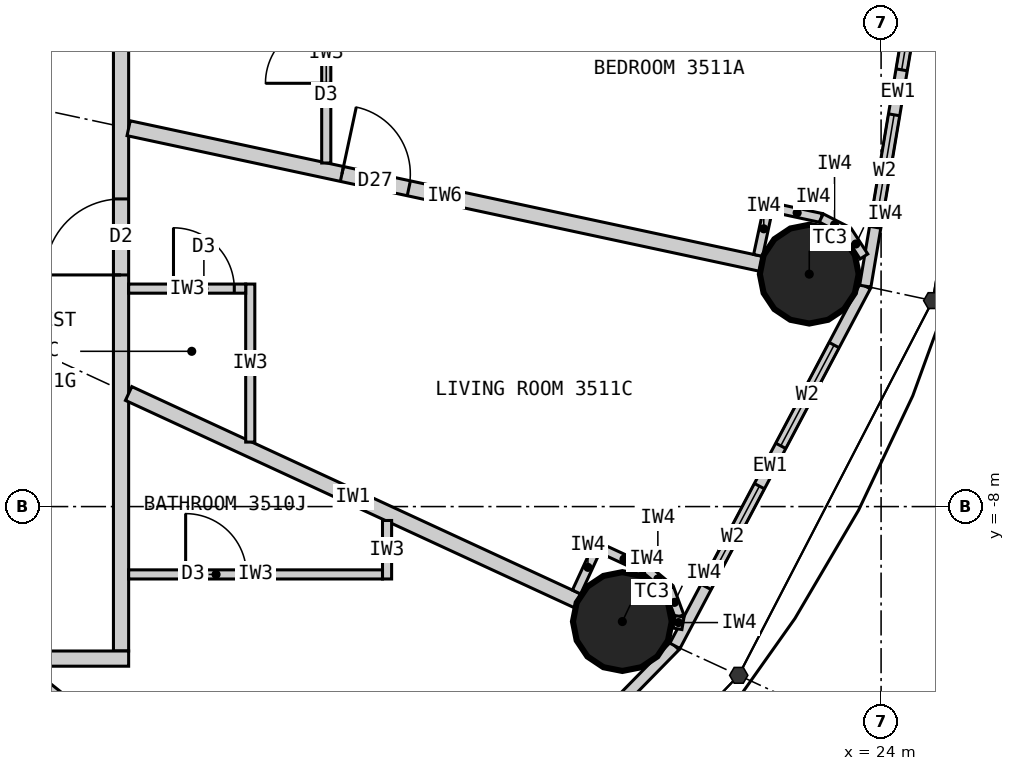
"""IFC4 building model, lengths in metres.
Left out: names, types, materials, properties, quantities, classifications, styles, units other than length and angle.
Written with IfcOpenShell. Run it as: python <this file> out.ifc"""

import sys

from ifc_helpers import new_model, si_unit, direction, frame, frame_2d, origin, origin_2d, place, context, subcontext, project, spatial, rectangle, circle, extrude, clip, halfspace, element, fill, save


model = new_model("IFC4")
c1 = context("Model", 3, precision=1e-05, world=origin(), true_north=direction((0.0, 1.0)))
c2 = subcontext(c1, "Body", "Model", "MODEL_VIEW")
j1 = project(units=[si_unit("LENGTHUNIT", "METRE"), si_unit("PLANEANGLEUNIT", "RADIAN")], contexts=[c1])
p1 = place(None, origin())
s1 = spatial("IfcSite", under=j1, at=p1, CompositionType="ELEMENT")
p2 = place(p1, origin())
s2 = spatial("IfcBuilding", under=s1, at=p2, CompositionType="ELEMENT")
p3 = place(p2, frame((0.0, 0.0, 135.3)))
s3 = spatial("IfcBuildingStorey", under=s2, at=p3, CompositionType="ELEMENT", Elevation=135.3)
for number, where, z_axis, x_axis in (
    (1, (20.596, -9.513, 0.0), (0.0, 0.0, 1.0), (1.0, 0.0, 0.0)),
    (2, (23.055, -4.942, 0.0), (0.0, 0.0, 1.0), (1.0, 0.0, 0.0)),
):
    element("IfcColumn", number, at=place(p3, frame(where, z_axis=z_axis, x_axis=x_axis)), inside=s3, PredefinedType="COLUMN", context=c2, shape_type="Clipping", body=[
        clip(extrude(circle(Radius=0.65, at=origin_2d()), origin(), (0.0, 0.0, 1.0), 3.3), halfspace(frame((0.0, 0.0, 2.25), z_axis=(0.0, 0.0, 1.0), x_axis=(1.0, 0.0, 0.0)), False)),
    ])
p4 = place(p3, frame((17.332, -13.866, 0.0), z_axis=(0.0, 0.0, 1.0), x_axis=(0.700136650834, 0.714008872605, 0.0)))
e3 = element("IfcWall", 3, at=p4, inside=s3, PredefinedType="ELEMENTEDWALL", context=c2, shape_type="SweptSolid", body=[
    extrude(rectangle(XDim=5.649, YDim=0.15, at=frame_2d((2.825, 0.0))), origin(), (0.0, 0.0, 1.0), 3.05),
])
p5 = place(p4, frame((1.025, 0.0, 0.9)))
e4 = element("IfcOpeningElement", 4, at=p5, cuts=e3, PredefinedType="OPENING", context=c2, shape_type="SweptSolid", body=[
    extrude(rectangle(XDim=1.5, YDim=1.9, at=frame_2d((0.75, 0.95))), frame((0.0, 0.085, 0.0), z_axis=(0.0, -1.0, 0.0), x_axis=(1.0, 0.0, 0.0)), (0.0, 0.0, 1.0), 0.17),
])
p6 = place(p4, frame((3.125, 0.0, 0.9)))
e5 = element("IfcOpeningElement", 5, at=p6, cuts=e3, PredefinedType="OPENING", context=c2, shape_type="SweptSolid", body=[
    extrude(rectangle(XDim=1.5, YDim=1.9, at=frame_2d((0.75, 0.95))), frame((0.0, 0.085, 0.0), z_axis=(0.0, -1.0, 0.0), x_axis=(1.0, 0.0, 0.0)), (0.0, 0.0, 1.0), 0.17),
])
p7 = place(p3, frame((21.287, -9.832, 0.0), z_axis=(0.0, 0.0, 1.0), x_axis=(0.467814388454, 0.883826735257, 0.0)))
e6 = element("IfcWall", 6, at=p7, inside=s3, PredefinedType="ELEMENTEDWALL", context=c2, shape_type="SweptSolid", body=[
    extrude(rectangle(XDim=5.354, YDim=0.15, at=frame_2d((2.677, 0.0))), origin(), (0.0, 0.0, 1.0), 3.05),
])
p8 = place(p7, frame((0.877, 0.0, 0.9)))
e7 = element("IfcOpeningElement", 7, at=p8, cuts=e6, PredefinedType="OPENING", context=c2, shape_type="SweptSolid", body=[
    extrude(rectangle(XDim=1.5, YDim=1.9, at=frame_2d((0.75, 0.95))), frame((0.0, 0.085, 0.0), z_axis=(0.0, -1.0, 0.0), x_axis=(1.0, 0.0, 0.0)), (0.0, 0.0, 1.0), 0.17),
])
p9 = place(p7, frame((2.977, 0.0, 0.9)))
e8 = element("IfcOpeningElement", 8, at=p9, cuts=e6, PredefinedType="OPENING", context=c2, shape_type="SweptSolid", body=[
    extrude(rectangle(XDim=1.5, YDim=1.9, at=frame_2d((0.75, 0.95))), frame((0.0, 0.085, 0.0), z_axis=(0.0, -1.0, 0.0), x_axis=(1.0, 0.0, 0.0)), (0.0, 0.0, 1.0), 0.17),
])
p10 = place(p3, frame((23.792, -5.1, 0.0), z_axis=(0.0, 0.0, 1.0), x_axis=(0.165883894218, 0.986145290329, 0.0)))
e9 = element("IfcWall", 9, at=p10, inside=s3, PredefinedType="ELEMENTEDWALL", context=c2, shape_type="SweptSolid", body=[
    extrude(rectangle(XDim=5.172, YDim=0.15, at=frame_2d((2.586, 0.0))), origin(), (0.0, 0.0, 1.0), 3.05),
])
p11 = place(p10, frame((0.786, 0.0, 0.9)))
e10 = element("IfcOpeningElement", 10, at=p11, cuts=e9, PredefinedType="OPENING", context=c2, shape_type="SweptSolid", body=[
    extrude(rectangle(XDim=1.5, YDim=1.9, at=frame_2d((0.75, 0.95))), frame((0.0, 0.085, 0.0), z_axis=(0.0, -1.0, 0.0), x_axis=(1.0, 0.0, 0.0)), (0.0, 0.0, 1.0), 0.17),
])
p12 = place(p10, frame((2.886, 0.0, 0.9)))
e11 = element("IfcOpeningElement", 11, at=p12, cuts=e9, PredefinedType="OPENING", context=c2, shape_type="SweptSolid", body=[
    extrude(rectangle(XDim=1.5, YDim=1.9, at=frame_2d((0.75, 0.95))), frame((0.0, 0.085, 0.0), z_axis=(0.0, -1.0, 0.0), x_axis=(1.0, 0.0, 0.0)), (0.0, 0.0, 1.0), 0.17),
])
p13 = place(p3, frame((14.0, -9.9, 0.0), z_axis=(0.0, 0.0, 1.0), x_axis=(0.0, 1.0, 0.0)))
e12 = element("IfcWall", 12, at=p13, inside=s3, PredefinedType="PARTITIONING", context=c2, shape_type="SweptSolid", body=[
    extrude(rectangle(XDim=19.8, YDim=0.2, at=frame_2d((9.9, 0.0))), origin(), (0.0, 0.0, 1.0), 3.05),
])
p14 = place(p13, frame((4.948, 0.0, 0.0)))
e13 = element("IfcOpeningElement", 13, at=p14, cuts=e12, PredefinedType="OPENING", context=c2, shape_type="SweptSolid", body=[
    extrude(rectangle(XDim=1.0, YDim=2.2, at=frame_2d((0.5, 1.1))), frame((0.0, 0.11, 0.0), z_axis=(0.0, -1.0, 0.0), x_axis=(1.0, 0.0, 0.0)), (0.0, 0.0, 1.0), 0.22),
])
p15 = place(p13, frame((18.641, 0.0, 0.0)))
e14 = element("IfcOpeningElement", 14, at=p15, cuts=e12, PredefinedType="OPENING", context=c2, shape_type="SweptSolid", body=[
    extrude(rectangle(XDim=1.0, YDim=2.2, at=frame_2d((0.5, 1.1))), frame((0.0, 0.11, 0.0), z_axis=(0.0, -1.0, 0.0), x_axis=(1.0, 0.0, 0.0)), (0.0, 0.0, 1.0), 0.22),
])
p16 = place(p3, frame((14.1, -10.0, 0.0), z_axis=(0.0, 0.0, 1.0), x_axis=(-1.0, 0.0, 0.0)))
e15 = element("IfcWall", 15, at=p16, inside=s3, PredefinedType="PARTITIONING", context=c2, shape_type="SweptSolid", body=[
    extrude(rectangle(XDim=28.2, YDim=0.2, at=frame_2d((14.1, 0.0))), origin(), (0.0, 0.0, 1.0), 3.05),
])
p17 = place(p16, frame((25.754, 0.0, 0.0)))
e16 = element("IfcOpeningElement", 16, at=p17, cuts=e15, PredefinedType="OPENING", context=c2, shape_type="SweptSolid", body=[
    extrude(rectangle(XDim=1.0, YDim=2.2, at=frame_2d((0.5, 1.1))), frame((0.0, 0.11, 0.0), z_axis=(0.0, -1.0, 0.0), x_axis=(1.0, 0.0, 0.0)), (0.0, 0.0, 1.0), 0.22),
])
p18 = place(p16, frame((18.029, 0.0, 0.0)))
e17 = element("IfcOpeningElement", 17, at=p18, cuts=e15, PredefinedType="OPENING", context=c2, shape_type="SweptSolid", body=[
    extrude(rectangle(XDim=1.0, YDim=2.2, at=frame_2d((0.5, 1.1))), frame((0.0, 0.11, 0.0), z_axis=(0.0, -1.0, 0.0), x_axis=(1.0, 0.0, 0.0)), (0.0, 0.0, 1.0), 0.22),
])
p19 = place(p16, frame((12.884, 0.0, 0.0)))
e18 = element("IfcOpeningElement", 18, at=p19, cuts=e15, PredefinedType="OPENING", context=c2, shape_type="SweptSolid", body=[
    extrude(rectangle(XDim=1.0, YDim=2.2, at=frame_2d((0.5, 1.1))), frame((0.0, 0.11, 0.0), z_axis=(0.0, -1.0, 0.0), x_axis=(1.0, 0.0, 0.0)), (0.0, 0.0, 1.0), 0.22),
])
p20 = place(p16, frame((9.075, 0.0, 0.0)))
e19 = element("IfcOpeningElement", 19, at=p20, cuts=e15, PredefinedType="OPENING", context=c2, shape_type="SweptSolid", body=[
    extrude(rectangle(XDim=1.0, YDim=2.2, at=frame_2d((0.5, 1.1))), frame((0.0, 0.11, 0.0), z_axis=(0.0, -1.0, 0.0), x_axis=(1.0, 0.0, 0.0)), (0.0, 0.0, 1.0), 0.22),
])
p21 = place(p16, frame((3.59, 0.0, 0.0)))
e20 = element("IfcOpeningElement", 20, at=p21, cuts=e15, PredefinedType="OPENING", context=c2, shape_type="SweptSolid", body=[
    extrude(rectangle(XDim=1.0, YDim=2.2, at=frame_2d((0.5, 1.1))), frame((0.0, 0.11, 0.0), z_axis=(0.0, -1.0, 0.0), x_axis=(1.0, 0.0, 0.0)), (0.0, 0.0, 1.0), 0.22),
])
p22 = place(p3, frame((12.625, -10.1, 0.0), z_axis=(0.0, 0.0, 1.0), x_axis=(0.780863644897, -0.624701503182, 0.0)))
e21 = element("IfcWall", 21, at=p22, inside=s3, PredefinedType="PARTITIONING", context=c2, shape_type="SweptSolid", body=[
    extrude(rectangle(XDim=4.612, YDim=0.2, at=frame_2d((2.306, 0.0))), origin(), (0.0, 0.0, 1.0), 2.15),
])
p23 = place(p22, frame((2.77, 0.0, 0.0)))
e22 = element("IfcOpeningElement", 22, at=p23, cuts=e21, PredefinedType="OPENING", context=c2, shape_type="SweptSolid", body=[
    extrude(rectangle(XDim=0.9, YDim=2.1, at=frame_2d((0.45, 1.05))), frame((0.0, 0.11, 0.0), z_axis=(0.0, -1.0, 0.0), x_axis=(1.0, 0.0, 0.0)), (0.0, 0.0, 1.0), 0.22),
])
p24 = place(p3, frame((14.1, -6.512, 0.0), z_axis=(0.0, 0.0, 1.0), x_axis=(0.907833019998, -0.419331858797, 0.0)))
e23 = element("IfcWall", 23, at=p24, inside=s3, PredefinedType="PARTITIONING", context=c2, shape_type="SweptSolid", body=[
    extrude(rectangle(XDim=6.505, YDim=0.2, at=frame_2d((3.252, 0.0))), origin(), (0.0, 0.0, 1.0), 2.15),
])
p25 = place(p3, frame((14.1, -3.022, 0.0), z_axis=(0.0, 0.0, 1.0), x_axis=(0.977783513367, -0.209617272638, 0.0)))
e24 = element("IfcWall", 24, at=p25, inside=s3, PredefinedType="PARTITIONING", context=c2, shape_type="SweptSolid", body=[
    extrude(rectangle(XDim=8.508, YDim=0.2, at=frame_2d((4.254, 0.0))), origin(), (0.0, 0.0, 1.0), 2.15),
])
p26 = place(p25, frame((2.87, 0.0, 0.0)))
e25 = element("IfcOpeningElement", 25, at=p26, cuts=e24, PredefinedType="OPENING", context=c2, shape_type="SweptSolid", body=[
    extrude(rectangle(XDim=0.9, YDim=2.1, at=frame_2d((0.45, 1.05))), frame((0.0, 0.11, 0.0), z_axis=(0.0, -1.0, 0.0), x_axis=(1.0, 0.0, 0.0)), (0.0, 0.0, 1.0), 0.22),
])
p27 = place(p3, frame((17.5, -8.183, 0.0), z_axis=(0.0, 0.0, 1.0), x_axis=(0.0, -1.0, 0.0)))
e26 = element("IfcWall", 26, at=p27, inside=s3, PredefinedType="PARTITIONING", context=c2, shape_type="SweptSolid", body=[
    extrude(rectangle(XDim=0.77, YDim=0.12, at=frame_2d((0.385, 0.0))), origin(), (0.0, 0.0, 1.0), 3.05),
])
p28 = place(p3, frame((14.1, -8.893, 0.0), z_axis=(0.0, 0.0, 1.0), x_axis=(1.0, 0.0, 0.0)))
e27 = element("IfcWall", 27, at=p28, inside=s3, PredefinedType="PARTITIONING", context=c2, shape_type="SweptSolid", body=[
    extrude(rectangle(XDim=3.34, YDim=0.12, at=frame_2d((1.67, 0.0))), origin(), (0.0, 0.0, 1.0), 3.05),
])
p29 = place(p28, frame((0.75, 0.0, 0.0)))
e28 = element("IfcOpeningElement", 28, at=p29, cuts=e27, PredefinedType="OPENING", context=c2, shape_type="SweptSolid", body=[
    extrude(rectangle(XDim=0.8, YDim=2.1, at=frame_2d((0.4, 1.05))), frame((0.0, 0.07, 0.0), z_axis=(0.0, -1.0, 0.0), x_axis=(1.0, 0.0, 0.0)), (0.0, 0.0, 1.0), 0.14),
])
p30 = place(p3, frame((15.7, -7.152, 0.0), z_axis=(0.0, 0.0, 1.0), x_axis=(0.0, 1.0, 0.0)))
e29 = element("IfcWall", 29, at=p30, inside=s3, PredefinedType="PARTITIONING", context=c2, shape_type="SweptSolid", body=[
    extrude(rectangle(XDim=2.079, YDim=0.12, at=frame_2d((1.04, 0.0))), origin(), (0.0, 0.0, 1.0), 3.05),
])
p31 = place(p3, frame((14.1, -5.133, 0.0), z_axis=(0.0, 0.0, 1.0), x_axis=(1.0, 0.0, 0.0)))
e30 = element("IfcWall", 30, at=p31, inside=s3, PredefinedType="PARTITIONING", context=c2, shape_type="SweptSolid", body=[
    extrude(rectangle(XDim=1.54, YDim=0.12, at=frame_2d((0.77, 0.0))), origin(), (0.0, 0.0, 1.0), 3.05),
])
p32 = place(p31, frame((0.59, 0.0, 0.0)))
e31 = element("IfcOpeningElement", 31, at=p32, cuts=e30, PredefinedType="OPENING", context=c2, shape_type="SweptSolid", body=[
    extrude(rectangle(XDim=0.8, YDim=2.1, at=frame_2d((0.4, 1.05))), frame((0.0, 0.07, 0.0), z_axis=(0.0, -1.0, 0.0), x_axis=(1.0, 0.0, 0.0)), (0.0, 0.0, 1.0), 0.14),
])
p33 = place(p3, frame((16.7, -3.48, 0.0), z_axis=(0.0, 0.0, 1.0), x_axis=(0.0, 1.0, 0.0)))
e32 = element("IfcWall", 32, at=p33, inside=s3, PredefinedType="PARTITIONING", context=c2, shape_type="SweptSolid", body=[
    extrude(rectangle(XDim=2.897, YDim=0.12, at=frame_2d((1.449, 0.0))), origin(), (0.0, 0.0, 1.0), 3.05),
])
p34 = place(p33, frame((1.049, 0.0, 0.0)))
e33 = element("IfcOpeningElement", 33, at=p34, cuts=e32, PredefinedType="OPENING", context=c2, shape_type="SweptSolid", body=[
    extrude(rectangle(XDim=0.8, YDim=2.1, at=frame_2d((0.4, 1.05))), frame((0.0, 0.07, 0.0), z_axis=(0.0, -1.0, 0.0), x_axis=(1.0, 0.0, 0.0)), (0.0, 0.0, 1.0), 0.14),
])
p35 = place(p3, frame((19.993, -9.124, 0.0), z_axis=(0.0, 0.0, 1.0), x_axis=(0.419447394118, 0.90777964483, 0.0)))
e34 = element("IfcWall", 34, at=p35, inside=s3, PredefinedType="PARTITIONING", context=c2, shape_type="SweptSolid", body=[
    extrude(rectangle(XDim=0.716, YDim=0.12, at=frame_2d((0.358, 0.0))), origin(), (0.0, 0.0, 1.0), 3.05),
])
p36 = place(p3, frame((20.323, -8.554, 0.0), z_axis=(0.0, 0.0, 1.0), x_axis=(0.907750418698, -0.419510640333, 0.0)))
e35 = element("IfcWall", 35, at=p36, inside=s3, PredefinedType="PARTITIONING", context=c2, shape_type="SweptSolid", body=[
    extrude(rectangle(XDim=0.65, YDim=0.12, at=frame_2d((0.325, 0.0))), origin(), (0.0, 0.0, 1.0), 3.05),
])
p37 = place(p3, frame((20.913, -8.827, 0.0), z_axis=(0.0, 0.0, 1.0), x_axis=(0.76847706684, -0.639877330229, 0.0)))
e36 = element("IfcWall", 36, at=p37, inside=s3, PredefinedType="PARTITIONING", context=c2, shape_type="SweptSolid", body=[
    extrude(rectangle(XDim=0.391, YDim=0.12, at=frame_2d((0.196, 0.0))), origin(), (0.0, 0.0, 1.0), 3.05),
])
p38 = place(p3, frame((21.213, -9.077, 0.0), z_axis=(0.0, 0.0, 1.0), x_axis=(0.345647532133, -0.938364419365, 0.0)))
e37 = element("IfcWall", 37, at=p38, inside=s3, PredefinedType="PARTITIONING", context=c2, shape_type="SweptSolid", body=[
    extrude(rectangle(XDim=0.391, YDim=0.12, at=frame_2d((0.196, 0.0))), origin(), (0.0, 0.0, 1.0), 3.05),
])
p39 = place(p3, frame((21.348, -9.444, 0.0), z_axis=(0.0, 0.0, 1.0), x_axis=(-0.170349493321, -0.985383707053, 0.0)))
e38 = element("IfcWall", 38, at=p39, inside=s3, PredefinedType="PARTITIONING", context=c2, shape_type="SweptSolid", body=[
    extrude(rectangle(XDim=0.166, YDim=0.12, at=frame_2d((0.083, 0.0))), origin(), (0.0, 0.0, 1.0), 3.05),
])
p40 = place(p3, frame((22.382, -4.695, 0.0), z_axis=(0.0, 0.0, 1.0), x_axis=(0.209808658628, 0.977742464438, 0.0)))
e39 = element("IfcWall", 39, at=p40, inside=s3, PredefinedType="PARTITIONING", context=c2, shape_type="SweptSolid", body=[
    extrude(rectangle(XDim=0.716, YDim=0.12, at=frame_2d((0.358, 0.0))), origin(), (0.0, 0.0, 1.0), 3.05),
])
p41 = place(p3, frame((22.578, -4.067, 0.0), z_axis=(0.0, 0.0, 1.0), x_axis=(0.977802414077, -0.209529088731, 0.0)))
e40 = element("IfcWall", 40, at=p41, inside=s3, PredefinedType="PARTITIONING", context=c2, shape_type="SweptSolid", body=[
    extrude(rectangle(XDim=0.65, YDim=0.12, at=frame_2d((0.325, 0.0))), origin(), (0.0, 0.0, 1.0), 3.05),
])
for number, where, z_axis, x_axis in (
    (41, (23.213, -4.203, 0.0), (0.0, 0.0, 1.0), (0.89, -0.456, 0.0)),
    (42, (23.562, -4.381, 0.0), (0.0, 0.0, 1.0), (0.543, -0.84, 0.0)),
):
    element("IfcWall", number, at=place(p3, frame(where, z_axis=z_axis, x_axis=x_axis)), inside=s3, PredefinedType="PARTITIONING", context=c2, shape_type="SweptSolid", body=[
        extrude(rectangle(XDim=0.391, YDim=0.12, at=frame_2d((0.196, 0.0))), origin(), (0.0, 0.0, 1.0), 3.05),
    ])
p42 = place(p8, origin())
e43 = element("IfcWindow", 43, at=p42, inside=s3, PartitioningType="SINGLE_PANEL", PredefinedType="WINDOW", context=c2, shape_type="SweptSolid", body=[
    extrude(rectangle(XDim=1.5, YDim=1.9, at=frame_2d((0.75, 0.95))), frame((0.0, 0.03, 0.0), z_axis=(0.0, -1.0, 0.0), x_axis=(1.0, 0.0, 0.0)), (0.0, 0.0, 1.0), 0.06),
])
fill(e7, e43)
p43 = place(p9, origin())
e44 = element("IfcWindow", 44, at=p43, inside=s3, PartitioningType="SINGLE_PANEL", PredefinedType="WINDOW", context=c2, shape_type="SweptSolid", body=[
    extrude(rectangle(XDim=1.5, YDim=1.9, at=frame_2d((0.75, 0.95))), frame((0.0, 0.03, 0.0), z_axis=(0.0, -1.0, 0.0), x_axis=(1.0, 0.0, 0.0)), (0.0, 0.0, 1.0), 0.06),
])
fill(e8, e44)
p44 = place(p11, origin())
e45 = element("IfcWindow", 45, at=p44, inside=s3, PartitioningType="SINGLE_PANEL", PredefinedType="WINDOW", context=c2, shape_type="SweptSolid", body=[
    extrude(rectangle(XDim=1.5, YDim=1.9, at=frame_2d((0.75, 0.95))), frame((0.0, 0.03, 0.0), z_axis=(0.0, -1.0, 0.0), x_axis=(1.0, 0.0, 0.0)), (0.0, 0.0, 1.0), 0.06),
])
fill(e10, e45)
p45 = place(p12, origin())
e46 = element("IfcWindow", 46, at=p45, inside=s3, PartitioningType="SINGLE_PANEL", PredefinedType="WINDOW", context=c2, shape_type="SweptSolid", body=[
    extrude(rectangle(XDim=1.5, YDim=1.9, at=frame_2d((0.75, 0.95))), frame((0.0, 0.03, 0.0), z_axis=(0.0, -1.0, 0.0), x_axis=(1.0, 0.0, 0.0)), (0.0, 0.0, 1.0), 0.06),
])
fill(e11, e46)
p46 = place(p29, origin())
e47 = element("IfcDoor", 47, at=p46, inside=s3, OperationType="SINGLE_SWING_LEFT", PredefinedType="DOOR", context=c2, shape_type="SweptSolid", body=[
    extrude(rectangle(XDim=0.8, YDim=2.1, at=frame_2d((0.4, 1.05))), frame((0.0, 0.025, 0.0), z_axis=(0.0, -1.0, 0.0), x_axis=(1.0, 0.0, 0.0)), (0.0, 0.0, 1.0), 0.05),
])
fill(e28, e47)
p47 = place(p32, origin())
e48 = element("IfcDoor", 48, at=p47, inside=s3, OperationType="SINGLE_SWING_LEFT", PredefinedType="DOOR", context=c2, shape_type="SweptSolid", body=[
    extrude(rectangle(XDim=0.8, YDim=2.1, at=frame_2d((0.4, 1.05))), frame((0.0, 0.025, 0.0), z_axis=(0.0, -1.0, 0.0), x_axis=(1.0, 0.0, 0.0)), (0.0, 0.0, 1.0), 0.05),
])
fill(e31, e48)
p48 = place(p14, origin())
e49 = element("IfcDoor", 49, at=p48, inside=s3, OperationType="SINGLE_SWING_LEFT", PredefinedType="DOOR", context=c2, shape_type="SweptSolid", body=[
    extrude(rectangle(XDim=1.0, YDim=2.2, at=frame_2d((0.5, 1.1))), frame((0.0, 0.025, 0.0), z_axis=(0.0, -1.0, 0.0), x_axis=(1.0, 0.0, 0.0)), (0.0, 0.0, 1.0), 0.05),
])
fill(e13, e49)
p49 = place(p34, origin())
e50 = element("IfcDoor", 50, at=p49, inside=s3, OperationType="SINGLE_SWING_LEFT", PredefinedType="DOOR", context=c2, shape_type="SweptSolid", body=[
    extrude(rectangle(XDim=0.8, YDim=2.1, at=frame_2d((0.4, 1.05))), frame((0.0, 0.025, 0.0), z_axis=(0.0, -1.0, 0.0), x_axis=(1.0, 0.0, 0.0)), (0.0, 0.0, 1.0), 0.05),
])
fill(e33, e50)
p50 = place(p26, origin())
e51 = element("IfcDoor", 51, at=p50, inside=s3, OperationType="SINGLE_SWING_LEFT", PredefinedType="DOOR", context=c2, shape_type="SweptSolid", body=[
    extrude(rectangle(XDim=0.9, YDim=2.1, at=frame_2d((0.45, 1.05))), frame((0.0, 0.025, 0.0), z_axis=(0.0, -1.0, 0.0), x_axis=(1.0, 0.0, 0.0)), (0.0, 0.0, 1.0), 0.05),
])
fill(e25, e51)
save(model, sys.argv[1])
